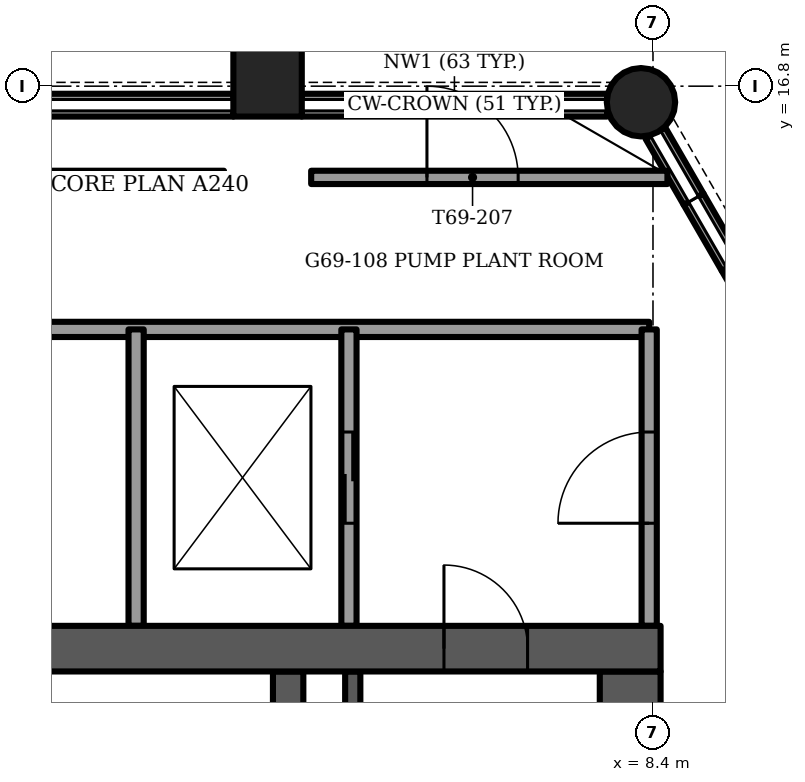
"""IFC4 building model, lengths in metres.
Left out: names, types, materials, properties, quantities, classifications, styles, units other than length and angle.
Written with IfcOpenShell. Run it as: python <this file> out.ifc"""

import sys

from ifc_helpers import new_model, si_unit, direction, frame, frame_2d, origin, origin_2d, place, context, subcontext, project, spatial, rectangle, circle, extrude, element, fill, save


model = new_model("IFC4")
c1 = context("Model", 3, precision=1e-05, world=origin(), true_north=direction((0.0, 1.0)))
c2 = subcontext(c1, "Body", "Model", "MODEL_VIEW")
j1 = project(units=[si_unit("LENGTHUNIT", "METRE"), si_unit("PLANEANGLEUNIT", "RADIAN")], contexts=[c1])
p1 = place(None, origin())
s1 = spatial("IfcSite", under=j1, at=p1, CompositionType="ELEMENT")
p2 = place(p1, origin())
s2 = spatial("IfcBuilding", under=s1, at=p2, CompositionType="ELEMENT")
p3 = place(p2, frame((0.0, 0.0, 279.5)))
s3 = spatial("IfcBuildingStorey", under=s2, at=p3, CompositionType="ELEMENT", Elevation=279.5)
p4 = place(p3, frame((-8.5, 9.4, -0.3), z_axis=(0.0, 0.0, 1.0), x_axis=(1.0, 0.0, 0.0)))
e1 = element("IfcWall", 1, at=p4, inside=s3, PredefinedType="SHEAR", context=c2, shape_type="SweptSolid", body=[
    extrude(rectangle(XDim=17.0, YDim=0.6, at=frame_2d((8.5, 0.0))), origin(), (0.0, 0.0, 1.0), 4.5),
])
p5 = place(p4, frame((1.75, 0.0, 0.0)))
e2 = element("IfcOpeningElement", 2, at=p5, cuts=e1, PredefinedType="OPENING", context=c2, shape_type="SweptSolid", body=[
    extrude(rectangle(XDim=1.1, YDim=2.1, at=frame_2d((0.55, 1.05))), frame((0.0, 0.3, 0.0), z_axis=(0.0, -1.0, 0.0), x_axis=(1.0, 0.0, 0.0)), (0.0, 0.0, 1.0), 0.6),
])
p6 = place(p4, frame((14.15, 0.0, 0.0)))
e3 = element("IfcOpeningElement", 3, at=p6, cuts=e1, PredefinedType="OPENING", context=c2, shape_type="SweptSolid", body=[
    extrude(rectangle(XDim=1.1, YDim=2.1, at=frame_2d((0.55, 1.05))), frame((0.0, 0.3, 0.0), z_axis=(0.0, -1.0, 0.0), x_axis=(1.0, 0.0, 0.0)), (0.0, 0.0, 1.0), 0.6),
])
p7 = place(p3, frame((8.1, -1.1, -0.3), z_axis=(0.0, 0.0, 1.0), x_axis=(0.0, 1.0, 0.0)))
e4 = element("IfcWall", 4, at=p7, inside=s3, PredefinedType="SHEAR", context=c2, shape_type="SweptSolid", body=[
    extrude(rectangle(XDim=10.2, YDim=0.8, at=frame_2d((5.1, 0.0))), origin(), (0.0, 0.0, 1.0), 4.5),
])
p8 = place(p7, frame((8.35, 0.0, 0.0)))
e5 = element("IfcOpeningElement", 5, at=p8, cuts=e4, PredefinedType="OPENING", context=c2, shape_type="SweptSolid", body=[
    extrude(rectangle(XDim=1.1, YDim=2.1, at=frame_2d((0.55, 1.05))), frame((0.0, 0.4, 0.0), z_axis=(0.0, -1.0, 0.0), x_axis=(1.0, 0.0, 0.0)), (0.0, 0.0, 1.0), 0.8),
])
p9 = place(p3, frame((3.6, -1.1, -0.3), z_axis=(0.0, 0.0, 1.0), x_axis=(0.0, 1.0, 0.0)))
e6 = element("IfcWall", 6, at=p9, inside=s3, PredefinedType="SHEAR", context=c2, shape_type="SweptSolid", body=[
    extrude(rectangle(XDim=10.2, YDim=0.4, at=frame_2d((5.1, 0.0))), origin(), (0.0, 0.0, 1.0), 4.5),
])
p10 = place(p3, frame((8.242, 16.589, -1.2), z_axis=(0.0, 0.0, 1.0), x_axis=(1.0, 0.0, 0.0)))
e7 = element("IfcColumn", 7, at=p10, inside=s3, PredefinedType="COLUMN", context=c2, shape_type="SweptSolid", body=[
    extrude(circle(Radius=0.45, at=origin_2d()), origin(), (0.0, 0.0, 1.0), 4.5),
])
p11 = place(p3, frame((3.329, 16.85, -1.2), z_axis=(0.0, 0.0, 1.0), x_axis=(1.0, 0.0, 0.0)))
e8 = element("IfcColumn", 8, at=p11, inside=s3, PredefinedType="COLUMN", context=c2, shape_type="SweptSolid", body=[
    extrude(rectangle(XDim=0.9, YDim=0.9, at=origin_2d()), origin(), (0.0, 0.0, 1.0), 4.5),
])
p12 = place(p3, frame((7.796, 16.55, 0.0), z_axis=(0.0, 0.0, 1.0), x_axis=(-1.0, 0.0, 0.0)))
e9 = element("IfcWall", 9, at=p12, inside=s3, PredefinedType="SOLIDWALL", context=c2, shape_type="SweptSolid", body=[
    extrude(rectangle(XDim=4.017, YDim=0.3, at=frame_2d((2.008, 0.0))), origin(), (0.0, 0.0, 1.0), 1.0),
])
p13 = place(p3, frame((2.879, 16.55, 0.0), z_axis=(0.0, 0.0, 1.0), x_axis=(-1.0, 0.0, 0.0)))
e10 = element("IfcWall", 10, at=p13, inside=s3, PredefinedType="SOLIDWALL", context=c2, shape_type="SweptSolid", body=[
    extrude(rectangle(XDim=5.759, YDim=0.3, at=frame_2d((2.879, 0.0))), origin(), (0.0, 0.0, 1.0), 1.0),
])
p14 = place(p3, frame((9.937, 13.576, 0.0), z_axis=(0.0, 0.0, 1.0), x_axis=(-0.499961250474, 0.866047774678, 0.0)))
e11 = element("IfcWall", 11, at=p14, inside=s3, PredefinedType="SOLIDWALL", context=c2, shape_type="SweptSolid", body=[
    extrude(rectangle(XDim=1.003, YDim=0.3, at=frame_2d((0.501, 0.0))), origin(), (0.0, 0.0, 1.0), 1.0),
])
p15 = place(p3, frame((9.435, 14.445, 0.0), z_axis=(0.0, 0.0, 1.0), x_axis=(-0.500038395149, 0.8660032352, 0.0)))
e12 = element("IfcWall", 12, at=p15, inside=s3, PredefinedType="SOLIDWALL", context=c2, shape_type="SweptSolid", body=[
    extrude(rectangle(XDim=1.003, YDim=0.3, at=frame_2d((0.502, 0.0))), origin(), (0.0, 0.0, 1.0), 1.0),
])
p16 = place(p3, frame((8.934, 15.314, 0.0), z_axis=(0.0, 0.0, 1.0), x_axis=(-0.500143783026, 0.865942374699, 0.0)))
e13 = element("IfcWall", 13, at=p16, inside=s3, PredefinedType="SOLIDWALL", context=c2, shape_type="SweptSolid", body=[
    extrude(rectangle(XDim=1.003, YDim=0.3, at=frame_2d((0.501, 0.0))), origin(), (0.0, 0.0, 1.0), 1.0),
])
p17 = place(p3, frame((-2.756, 15.6, 0.0), z_axis=(0.0, 0.0, 1.0), x_axis=(1.0, 0.0, 0.0)))
e14 = element("IfcWall", 14, at=p17, inside=s3, PredefinedType="PARTITIONING", context=c2, shape_type="SweptSolid", body=[
    extrude(rectangle(XDim=5.512, YDim=0.175, at=frame_2d((2.756, 0.0))), origin(), (0.0, 0.0, 1.0), 4.2),
])
p18 = place(p3, frame((3.903, 15.6, 0.0), z_axis=(0.0, 0.0, 1.0), x_axis=(1.0, 0.0, 0.0)))
e15 = element("IfcWall", 15, at=p18, inside=s3, PredefinedType="PARTITIONING", context=c2, shape_type="SweptSolid", body=[
    extrude(rectangle(XDim=4.687, YDim=0.175, at=frame_2d((2.344, 0.0))), origin(), (0.0, 0.0, 1.0), 4.2),
])
p19 = place(p18, frame((1.523, 0.0, 0.0)))
e16 = element("IfcOpeningElement", 16, at=p19, cuts=e15, PredefinedType="OPENING", context=c2, shape_type="SweptSolid", body=[
    extrude(rectangle(XDim=1.2, YDim=2.1, at=frame_2d((0.6, 1.05))), frame((0.0, 0.087, 0.0), z_axis=(0.0, -1.0, 0.0), x_axis=(1.0, 0.0, 0.0)), (0.0, 0.0, 1.0), 0.175),
])
p20 = place(p3, frame((4.45, 0.9, -0.3), z_axis=(0.0, 0.0, 1.0), x_axis=(0.0, 1.0, 0.0)))
e17 = element("IfcWall", 17, at=p20, inside=s3, PredefinedType="SOLIDWALL", context=c2, shape_type="SweptSolid", body=[
    extrude(rectangle(XDim=8.2, YDim=0.2, at=frame_2d((4.1, 0.0))), origin(), (0.0, 0.0, 1.0), 4.5),
])
p21 = place(p3, frame((-8.35, 13.6, 0.0), z_axis=(0.0, 0.0, 1.0), x_axis=(1.0, 0.0, 0.0)))
e18 = element("IfcWall", 18, at=p21, inside=s3, PredefinedType="PARTITIONING", context=c2, shape_type="SweptSolid", body=[
    extrude(rectangle(XDim=16.7, YDim=0.2, at=frame_2d((8.35, 0.0))), origin(), (0.0, 0.0, 1.0), 4.2),
])
p22 = place(p3, frame((8.35, 9.7, 0.0), z_axis=(0.0, 0.0, 1.0), x_axis=(0.0, 1.0, 0.0)))
e19 = element("IfcWall", 19, at=p22, inside=s3, PredefinedType="PARTITIONING", context=c2, shape_type="SweptSolid", body=[
    extrude(rectangle(XDim=3.9, YDim=0.2, at=frame_2d((1.95, 0.0))), origin(), (0.0, 0.0, 1.0), 4.2),
])
p23 = place(p22, frame((1.35, 0.0, 0.0)))
e20 = element("IfcOpeningElement", 20, at=p23, cuts=e19, PredefinedType="OPENING", context=c2, shape_type="SweptSolid", body=[
    extrude(rectangle(XDim=1.2, YDim=2.1, at=frame_2d((0.6, 1.05))), frame((0.0, 0.1, 0.0), z_axis=(0.0, -1.0, 0.0), x_axis=(1.0, 0.0, 0.0)), (0.0, 0.0, 1.0), 0.2),
])
p24 = place(p3, frame((4.4, 9.7, 0.0), z_axis=(0.0, 0.0, 1.0), x_axis=(0.0, 1.0, 0.0)))
e21 = element("IfcWall", 21, at=p24, inside=s3, PredefinedType="PARTITIONING", context=c2, shape_type="SweptSolid", body=[
    extrude(rectangle(XDim=3.9, YDim=0.2, at=frame_2d((1.95, 0.0))), origin(), (0.0, 0.0, 1.0), 4.2),
])
p25 = place(p24, frame((1.35, 0.0, 0.0)))
e22 = element("IfcOpeningElement", 22, at=p25, cuts=e21, PredefinedType="OPENING", context=c2, shape_type="SweptSolid", body=[
    extrude(rectangle(XDim=1.2, YDim=2.1, at=frame_2d((0.6, 1.05))), frame((0.0, 0.1, 0.0), z_axis=(0.0, -1.0, 0.0), x_axis=(1.0, 0.0, 0.0)), (0.0, 0.0, 1.0), 0.2),
])
p26 = place(p3, frame((1.6, 9.7, 0.0), z_axis=(0.0, 0.0, 1.0), x_axis=(0.0, 1.0, 0.0)))
e23 = element("IfcWall", 23, at=p26, inside=s3, PredefinedType="PARTITIONING", context=c2, shape_type="SweptSolid", body=[
    extrude(rectangle(XDim=3.9, YDim=0.2, at=frame_2d((1.95, 0.0))), origin(), (0.0, 0.0, 1.0), 4.2),
])
p27 = place(p19, origin())
e24 = element("IfcDoor", 24, at=p27, inside=s3, OperationType="SINGLE_SWING_LEFT", PredefinedType="DOOR", context=c2, shape_type="SweptSolid", body=[
    extrude(rectangle(XDim=1.2, YDim=2.1, at=frame_2d((0.6, 1.05))), frame((0.0, 0.025, 0.0), z_axis=(0.0, -1.0, 0.0), x_axis=(1.0, 0.0, 0.0)), (0.0, 0.0, 1.0), 0.05),
])
fill(e16, e24)
p28 = place(p6, origin())
e25 = element("IfcDoor", 25, at=p28, inside=s3, OperationType="SINGLE_SWING_RIGHT", PredefinedType="DOOR", context=c2, shape_type="SweptSolid", body=[
    extrude(rectangle(XDim=1.1, YDim=2.1, at=frame_2d((0.55, 1.05))), frame((0.0, 0.025, 0.0), z_axis=(0.0, -1.0, 0.0), x_axis=(1.0, 0.0, 0.0)), (0.0, 0.0, 1.0), 0.05),
])
fill(e3, e25)
p29 = place(p25, origin())
e26 = element("IfcDoor", 26, at=p29, inside=s3, OperationType="SLIDING_TO_LEFT", PredefinedType="DOOR", context=c2, shape_type="SweptSolid", body=[
    extrude(rectangle(XDim=1.2, YDim=2.1, at=frame_2d((0.6, 1.05))), frame((0.0, 0.025, 0.0), z_axis=(0.0, -1.0, 0.0), x_axis=(1.0, 0.0, 0.0)), (0.0, 0.0, 1.0), 0.05),
])
fill(e22, e26)
p30 = place(p23, origin())
e27 = element("IfcDoor", 27, at=p30, inside=s3, OperationType="SINGLE_SWING_LEFT", PredefinedType="DOOR", context=c2, shape_type="SweptSolid", body=[
    extrude(rectangle(XDim=1.2, YDim=2.1, at=frame_2d((0.6, 1.05))), frame((0.0, 0.025, 0.0), z_axis=(0.0, -1.0, 0.0), x_axis=(1.0, 0.0, 0.0)), (0.0, 0.0, 1.0), 0.05),
])
fill(e20, e27)
save(model, sys.argv[1])
